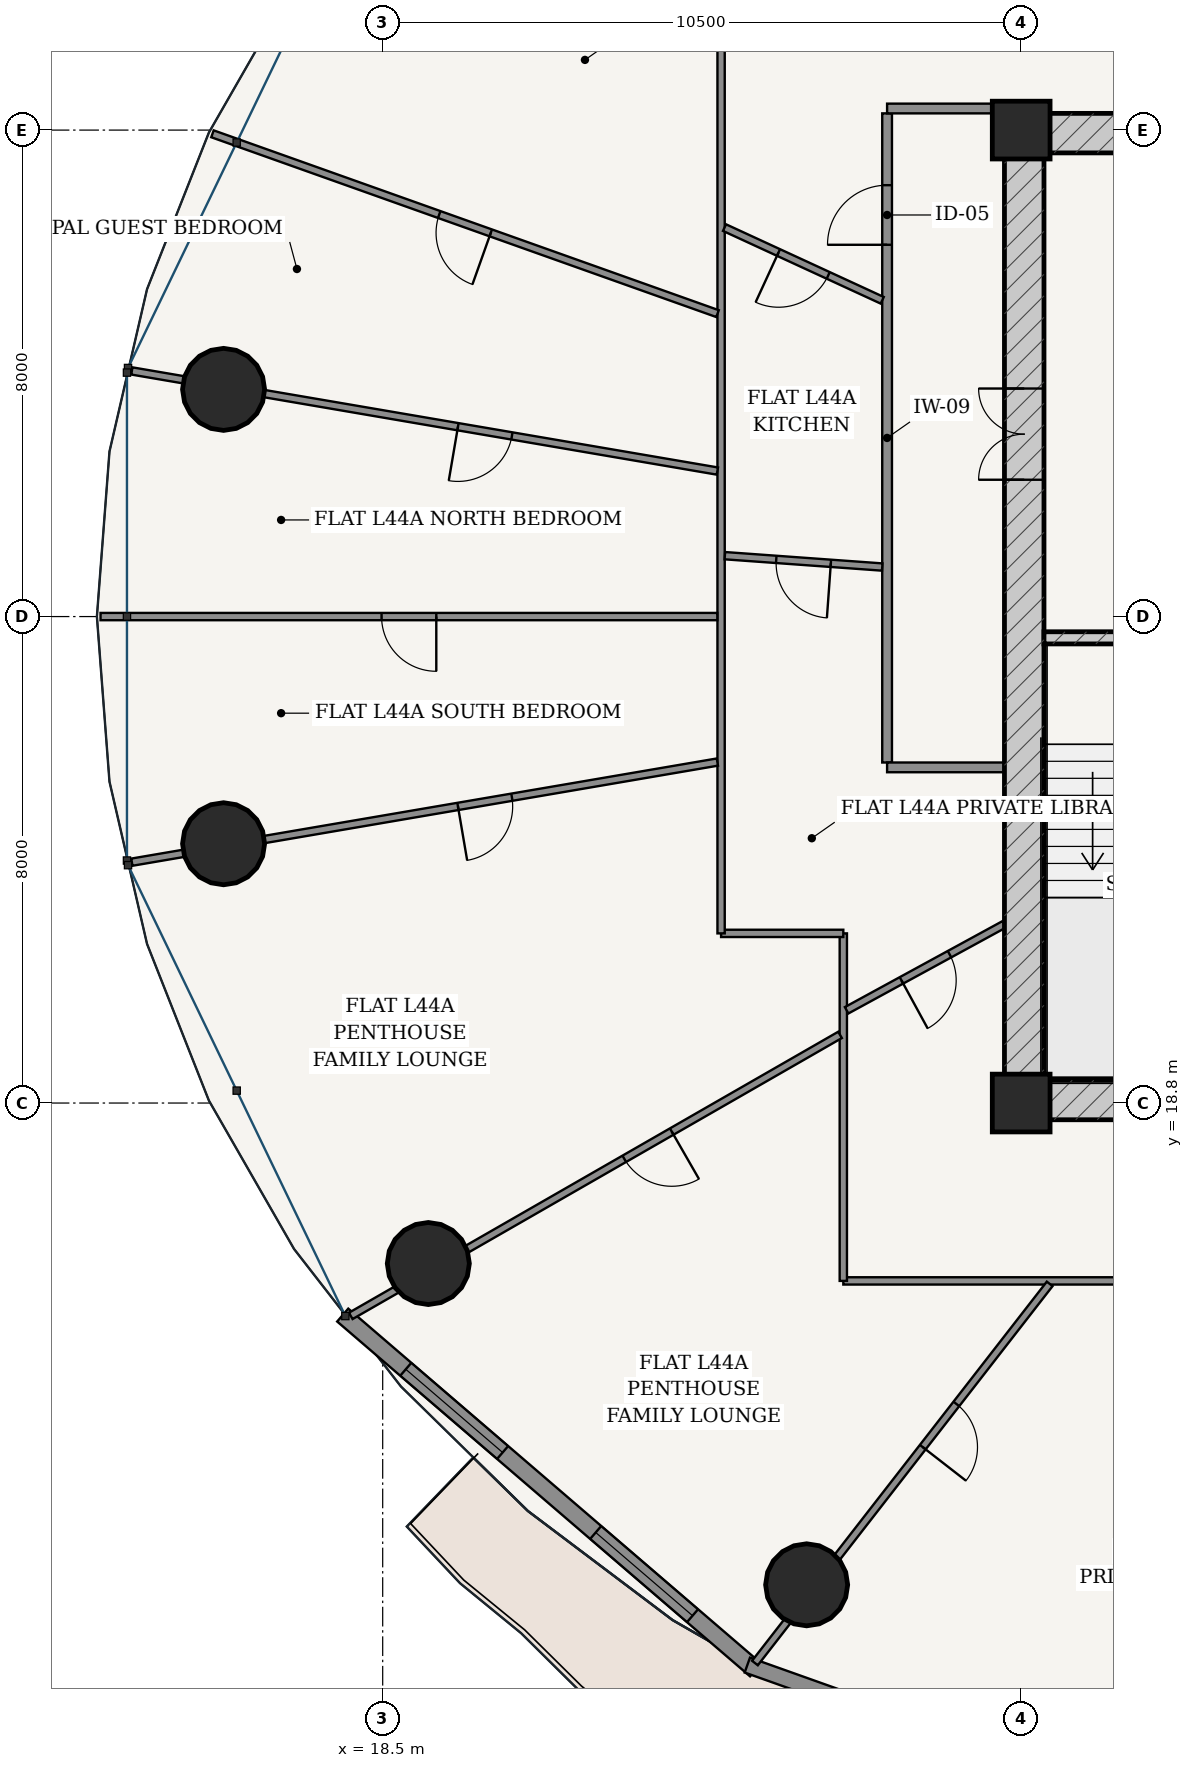
"""IFC4 building model, lengths in metres.
Left out: names, types, materials, properties, quantities, classifications, styles, units other than length and angle.
Written with IfcOpenShell. Run it as: python <this file> out.ifc"""

import sys

from ifc_helpers import new_model, si_unit, direction, frame, frame_2d, origin, origin_2d, place, context, subcontext, project, spatial, rectangle, hollow_circle, extrude, source, transform, mapped, element, fill, save


model = new_model("IFC4")
c1 = context("Model", 3, precision=1e-05, world=origin(), true_north=direction((-0.2419218956, 0.970295726276)))
c2 = subcontext(c1, "Body", "Model", "MODEL_VIEW")
j1 = project(units=[si_unit("LENGTHUNIT", "METRE"), si_unit("PLANEANGLEUNIT", "RADIAN")], contexts=[c1])
p1 = place(None, origin())
s1 = spatial("IfcSite", under=j1, at=p1, CompositionType="ELEMENT")
p2 = place(p1, origin())
s2 = spatial("IfcBuilding", under=s1, at=p2, CompositionType="ELEMENT")
p3 = place(p2, frame((0.0, 0.0, 167.8)))
s3 = spatial("IfcBuildingStorey", under=s2, at=p3, CompositionType="ELEMENT", Elevation=167.8)
for number, where, z_axis, x_axis in (
    (1, (29.0, 18.8, 0.0), (0.0, 0.0, 1.0), (1.0, 0.0, 0.0)),
    (2, (29.0, 34.8, 0.0), (0.0, 0.0, 1.0), (1.0, 0.0, 0.0)),
):
    element("IfcColumn", number, at=place(p3, frame(where, z_axis=z_axis, x_axis=x_axis)), inside=s3, PredefinedType="COLUMN", context=c2, shape_type="SweptSolid", body=[
        extrude(rectangle(XDim=0.95, YDim=0.95, at=origin_2d()), origin(), (0.0, 0.0, 1.0), 3.6),
    ])
p4 = place(p3, frame((28.725, 18.85, 0.0), z_axis=(0.0, 0.0, 1.0), x_axis=(1.0, 0.0, 0.0)))
e3 = element("IfcWall", 3, at=p4, inside=s3, PredefinedType="SHEAR", context=c2, shape_type="SweptSolid", body=[
    extrude(rectangle(XDim=18.55, YDim=0.65, at=frame_2d((9.275, 0.0))), origin(), (0.0, 0.0, 1.0), 3.33),
])
p5 = place(p4, frame((6.81, 0.0, 0.0)))
e4 = element("IfcOpeningElement", 4, at=p5, cuts=e3, PredefinedType="OPENING", context=c2, shape_type="SweptSolid", body=[
    extrude(rectangle(XDim=0.85, YDim=2.1, at=frame_2d((0.425, 1.05))), frame((0.0, 0.335, 0.0), z_axis=(0.0, -1.0, 0.0), x_axis=(1.0, 0.0, 0.0)), (0.0, 0.0, 1.0), 0.67),
])
p6 = place(p4, frame((8.85, 0.0, 0.0)))
e5 = element("IfcOpeningElement", 5, at=p6, cuts=e3, PredefinedType="OPENING", context=c2, shape_type="SweptSolid", body=[
    extrude(rectangle(XDim=0.85, YDim=2.1, at=frame_2d((0.425, 1.05))), frame((0.0, 0.335, 0.0), z_axis=(0.0, -1.0, 0.0), x_axis=(1.0, 0.0, 0.0)), (0.0, 0.0, 1.0), 0.67),
])
p7 = place(p4, frame((10.89, 0.0, 0.0)))
e6 = element("IfcOpeningElement", 6, at=p7, cuts=e3, PredefinedType="OPENING", context=c2, shape_type="SweptSolid", body=[
    extrude(rectangle(XDim=0.85, YDim=2.1, at=frame_2d((0.425, 1.05))), frame((0.0, 0.335, 0.0), z_axis=(0.0, -1.0, 0.0), x_axis=(1.0, 0.0, 0.0)), (0.0, 0.0, 1.0), 0.67),
])
p8 = place(p3, frame((28.725, 34.75, 0.0), z_axis=(0.0, 0.0, 1.0), x_axis=(1.0, 0.0, 0.0)))
e7 = element("IfcWall", 7, at=p8, inside=s3, PredefinedType="SHEAR", context=c2, shape_type="SweptSolid", body=[
    extrude(rectangle(XDim=18.55, YDim=0.65, at=frame_2d((9.275, 0.0))), origin(), (0.0, 0.0, 1.0), 3.33),
])
p9 = place(p3, frame((29.05, 19.175, 0.0), z_axis=(0.0, 0.0, 1.0), x_axis=(0.0, 1.0, 0.0)))
e8 = element("IfcWall", 8, at=p9, inside=s3, PredefinedType="SHEAR", context=c2, shape_type="SweptSolid", body=[
    extrude(rectangle(XDim=15.25, YDim=0.65, at=frame_2d((7.625, 0.0))), origin(), (0.0, 0.0, 1.0), 3.33),
])
p10 = place(p9, frame((9.875, 0.0, 0.0)))
e9 = element("IfcOpeningElement", 9, at=p10, cuts=e8, PredefinedType="OPENING", context=c2, shape_type="SweptSolid", body=[
    extrude(rectangle(XDim=1.5, YDim=2.2, at=frame_2d((0.75, 1.1))), frame((0.0, 0.335, 0.0), z_axis=(0.0, -1.0, 0.0), x_axis=(1.0, 0.0, 0.0)), (0.0, 0.0, 1.0), 0.67),
])
p11 = place(p3, frame((29.375, 26.45, 0.0), z_axis=(0.0, 0.0, 1.0), x_axis=(1.0, 0.0, 0.0)))
e10 = element("IfcWall", 10, at=p11, inside=s3, PredefinedType="SOLIDWALL", context=c2, shape_type="SweptSolid", body=[
    extrude(rectangle(XDim=3.32, YDim=0.2, at=frame_2d((1.66, 0.0))), origin(), (0.0, 0.0, 1.0), 3.33),
])
p12 = place(p11, frame((1.185, 0.0, 0.0)))
e11 = element("IfcOpeningElement", 11, at=p12, cuts=e10, PredefinedType="OPENING", context=c2, shape_type="SweptSolid", body=[
    extrude(rectangle(XDim=0.95, YDim=2.15, at=frame_2d((0.475, 1.075))), frame((0.0, 0.11, 0.0), z_axis=(0.0, -1.0, 0.0), x_axis=(1.0, 0.0, 0.0)), (0.0, 0.0, 1.0), 0.22),
])
for number, where, z_axis, x_axis in (
    (12, (15.883, 30.536, 0.0), (0.0, 0.0, 1.0), (1.0, 0.0, 0.0)),
    (13, (15.883, 23.064, 0.0), (0.0, 0.0, 1.0), (1.0, 0.0, 0.0)),
    (14, (19.25, 16.161, 0.0), (0.0, 0.0, 1.0), (1.0, 0.0, 0.0)),
    (15, (25.472, 10.877, 0.0), (0.0, 0.0, 1.0), (1.0, 0.0, 0.0)),
):
    element("IfcColumn", number, at=place(p3, frame(where, z_axis=z_axis, x_axis=x_axis)), inside=s3, PredefinedType="COLUMN", context=c2, shape_type="SweptSolid", body=[
        extrude(hollow_circle(Radius=0.675, WallThickness=0.042, at=origin_2d()), origin(), (0.0, 0.0, 1.0), 3.6),
    ])
p13 = place(p3, frame((17.843, 15.313, 0.0), z_axis=(0.0, 0.0, 1.0), x_axis=(0.75843401647, -0.651749831348, 0.0)))
e16 = element("IfcWall", 16, at=p13, inside=s3, PredefinedType="SOLIDWALL", context=c2, shape_type="SweptSolid", body=[
    extrude(rectangle(XDim=8.952, YDim=0.28, at=frame_2d((4.476, 0.0))), origin(), (0.0, 0.0, 1.0), 3.33),
])
p14 = place(p13, frame((1.367, 0.0, 0.85)))
e17 = element("IfcOpeningElement", 17, at=p14, cuts=e16, PredefinedType="OPENING", context=c2, shape_type="SweptSolid", body=[
    extrude(rectangle(XDim=2.1, YDim=1.95, at=frame_2d((1.05, 0.975))), frame((0.0, 0.15, 0.0), z_axis=(0.0, -1.0, 0.0), x_axis=(1.0, 0.0, 0.0)), (0.0, 0.0, 1.0), 0.3),
])
p15 = place(p13, frame((5.485, 0.0, 0.85)))
e18 = element("IfcOpeningElement", 18, at=p15, cuts=e16, PredefinedType="OPENING", context=c2, shape_type="SweptSolid", body=[
    extrude(rectangle(XDim=2.1, YDim=1.95, at=frame_2d((1.05, 0.975))), frame((0.0, 0.15, 0.0), z_axis=(0.0, -1.0, 0.0), x_axis=(1.0, 0.0, 0.0)), (0.0, 0.0, 1.0), 0.3),
])
p16 = place(p3, frame((24.497, 9.557, 0.0), z_axis=(0.0, 0.0, 1.0), x_axis=(0.942103604331, -0.335321932934, 0.0)))
e19 = element("IfcWall", 19, at=p16, inside=s3, PredefinedType="SOLIDWALL", context=c2, shape_type="SweptSolid", body=[
    extrude(rectangle(XDim=9.408, YDim=0.26, at=frame_2d((4.704, 0.0))), origin(), (0.0, 0.0, 1.0), 3.33),
])
p17 = place(p16, frame((4.029, 0.0, 0.0)))
e20 = element("IfcOpeningElement", 20, at=p17, cuts=e19, PredefinedType="OPENING", context=c2, shape_type="SweptSolid", body=[
    extrude(rectangle(XDim=1.35, YDim=2.2, at=frame_2d((0.675, 1.1))), frame((0.0, 0.14, 0.0), z_axis=(0.0, -1.0, 0.0), x_axis=(1.0, 0.0, 0.0)), (0.0, 0.0, 1.0), 0.28),
])
p18 = place(p3, frame((26.795, 24.4, 0.0), z_axis=(0.0, 0.0, 1.0), x_axis=(0.0, 1.0, 0.0)))
e21 = element("IfcWall", 21, at=p18, inside=s3, PredefinedType="PARTITIONING", context=c2, shape_type="SweptSolid", body=[
    extrude(rectangle(XDim=10.675, YDim=0.16, at=frame_2d((5.337, 0.0))), origin(), (0.0, 0.0, 1.0), 2.776),
])
p19 = place(p18, frame((8.514, 0.0, 0.0)))
e22 = element("IfcOpeningElement", 22, at=p19, cuts=e21, PredefinedType="OPENING", context=c2, shape_type="SweptSolid", body=[
    extrude(rectangle(XDim=0.98, YDim=2.2, at=frame_2d((0.49, 1.1))), frame((0.0, 0.09, 0.0), z_axis=(0.0, -1.0, 0.0), x_axis=(1.0, 0.0, 0.0)), (0.0, 0.0, 1.0), 0.18),
])
p20 = place(p3, frame((26.795, 35.155, 0.0), z_axis=(0.0, 0.0, 1.0), x_axis=(1.0, 0.0, 0.0)))
e23 = element("IfcWall", 23, at=p20, inside=s3, PredefinedType="PARTITIONING", context=c2, shape_type="SweptSolid", body=[
    extrude(rectangle(XDim=1.93, YDim=0.16, at=frame_2d((0.965, 0.0))), origin(), (0.0, 0.0, 1.0), 2.776),
])
p21 = place(p3, frame((26.795, 24.32, 0.0), z_axis=(0.0, 0.0, 1.0), x_axis=(1.0, 0.0, 0.0)))
e24 = element("IfcWall", 24, at=p21, inside=s3, PredefinedType="PARTITIONING", context=c2, shape_type="SweptSolid", body=[
    extrude(rectangle(XDim=1.93, YDim=0.16, at=frame_2d((0.965, 0.0))), origin(), (0.0, 0.0, 1.0), 3.33),
])
p22 = place(p3, frame((31.59, 15.875, 0.0), z_axis=(0.0, 0.0, 1.0), x_axis=(-1.0, 0.0, 0.0)))
e25 = element("IfcWall", 25, at=p22, inside=s3, PredefinedType="PARTITIONING", context=c2, shape_type="SweptSolid", body=[
    extrude(rectangle(XDim=5.515, YDim=0.12, at=frame_2d((2.758, 0.0))), origin(), (0.0, 0.0, 1.0), 2.776),
])
p23 = place(p3, frame((26.075, 15.875, 0.0), z_axis=(0.0, 0.0, 1.0), x_axis=(0.0, 1.0, 0.0)))
e26 = element("IfcWall", 26, at=p23, inside=s3, PredefinedType="PARTITIONING", context=c2, shape_type="SweptSolid", body=[
    extrude(rectangle(XDim=5.715, YDim=0.12, at=frame_2d((2.857, 0.0))), origin(), (0.0, 0.0, 1.0), 2.776),
])
p24 = place(p3, frame((26.075, 21.59, 0.0), z_axis=(0.0, 0.0, 1.0), x_axis=(-1.0, 0.0, 0.0)))
e27 = element("IfcWall", 27, at=p24, inside=s3, PredefinedType="PARTITIONING", context=c2, shape_type="SweptSolid", body=[
    extrude(rectangle(XDim=2.01, YDim=0.12, at=frame_2d((1.005, 0.0))), origin(), (0.0, 0.0, 1.0), 3.33),
])
p25 = place(p3, frame((24.065, 21.59, 0.0), z_axis=(0.0, 0.0, 1.0), x_axis=(0.0, 1.0, 0.0)))
e28 = element("IfcWall", 28, at=p25, inside=s3, PredefinedType="PARTITIONING", context=c2, shape_type="SweptSolid", body=[
    extrude(rectangle(XDim=16.295, YDim=0.12, at=frame_2d((8.147, 0.0))), origin(), (0.0, 0.0, 1.0), 2.776),
])
p26 = place(p3, frame((24.007, 31.782, 0.0), z_axis=(0.0, 0.0, 1.0), x_axis=(-0.942077868165, 0.335394231187, 0.0)))
e29 = element("IfcWall", 29, at=p26, inside=s3, PredefinedType="PARTITIONING", context=c2, shape_type="SweptSolid", body=[
    extrude(rectangle(XDim=8.817, YDim=0.12, at=frame_2d((4.408, 0.0))), origin(), (0.0, 0.0, 1.0), 2.846),
])
p27 = place(p26, frame((3.958, 0.0, 0.0)))
e30 = element("IfcOpeningElement", 30, at=p27, cuts=e29, PredefinedType="OPENING", context=c2, shape_type="SweptSolid", body=[
    extrude(rectangle(XDim=0.9, YDim=2.15, at=frame_2d((0.45, 1.075))), frame((0.0, 0.07, 0.0), z_axis=(0.0, -1.0, 0.0), x_axis=(1.0, 0.0, 0.0)), (0.0, 0.0, 1.0), 0.14),
])
p28 = place(p3, frame((24.004, 29.193, 0.0), z_axis=(0.0, 0.0, 1.0), x_axis=(-0.985698378271, 0.168519159369, 0.0)))
e31 = element("IfcWall", 31, at=p28, inside=s3, PredefinedType="PARTITIONING", context=c2, shape_type="SweptSolid", body=[
    extrude(rectangle(XDim=9.769, YDim=0.12, at=frame_2d((4.884, 0.0))), origin(), (0.0, 0.0, 1.0), 2.776),
])
p29 = place(p28, frame((3.428, 0.0, 0.0)))
e32 = element("IfcOpeningElement", 32, at=p29, cuts=e31, PredefinedType="OPENING", context=c2, shape_type="SweptSolid", body=[
    extrude(rectangle(XDim=0.9, YDim=2.15, at=frame_2d((0.45, 1.075))), frame((0.0, 0.07, 0.0), z_axis=(0.0, -1.0, 0.0), x_axis=(1.0, 0.0, 0.0)), (0.0, 0.0, 1.0), 0.14),
])
p30 = place(p3, frame((24.003, 26.8, 0.0), z_axis=(0.0, 0.0, 1.0), x_axis=(-1.0, 0.0, 0.0)))
e33 = element("IfcWall", 33, at=p30, inside=s3, PredefinedType="PARTITIONING", context=c2, shape_type="SweptSolid", body=[
    extrude(rectangle(XDim=10.143, YDim=0.12, at=frame_2d((5.071, 0.0))), origin(), (0.0, 0.0, 1.0), 2.846),
])
p31 = place(p30, frame((4.622, 0.0, 0.0)))
e34 = element("IfcOpeningElement", 34, at=p31, cuts=e33, PredefinedType="OPENING", context=c2, shape_type="SweptSolid", body=[
    extrude(rectangle(XDim=0.9, YDim=2.15, at=frame_2d((0.45, 1.075))), frame((0.0, 0.07, 0.0), z_axis=(0.0, -1.0, 0.0), x_axis=(1.0, 0.0, 0.0)), (0.0, 0.0, 1.0), 0.14),
])
p32 = place(p3, frame((24.004, 24.407, 0.0), z_axis=(0.0, 0.0, 1.0), x_axis=(-0.985698378271, -0.168519159369, 0.0)))
e35 = element("IfcWall", 35, at=p32, inside=s3, PredefinedType="PARTITIONING", context=c2, shape_type="SweptSolid", body=[
    extrude(rectangle(XDim=9.769, YDim=0.12, at=frame_2d((4.884, 0.0))), origin(), (0.0, 0.0, 1.0), 2.776),
])
p33 = place(p32, frame((3.428, 0.0, 0.0)))
e36 = element("IfcOpeningElement", 36, at=p33, cuts=e35, PredefinedType="OPENING", context=c2, shape_type="SweptSolid", body=[
    extrude(rectangle(XDim=0.9, YDim=2.15, at=frame_2d((0.45, 1.075))), frame((0.0, 0.07, 0.0), z_axis=(0.0, -1.0, 0.0), x_axis=(1.0, 0.0, 0.0)), (0.0, 0.0, 1.0), 0.14),
])
p34 = place(p3, frame((26.021, 19.921, 0.0), z_axis=(0.0, 0.0, 1.0), x_axis=(-0.867161148693, -0.498027652041, 0.0)))
e37 = element("IfcWall", 37, at=p34, inside=s3, PredefinedType="PARTITIONING", context=c2, shape_type="SweptSolid", body=[
    extrude(rectangle(XDim=9.279, YDim=0.12, at=frame_2d((4.64, 0.0))), origin(), (0.0, 0.0, 1.0), 2.776),
])
p35 = place(p34, frame((3.192, 0.0, 0.0)))
e38 = element("IfcOpeningElement", 38, at=p35, cuts=e37, PredefinedType="OPENING", context=c2, shape_type="SweptSolid", body=[
    extrude(rectangle(XDim=0.9, YDim=2.15, at=frame_2d((0.45, 1.075))), frame((0.0, 0.07, 0.0), z_axis=(0.0, -1.0, 0.0), x_axis=(1.0, 0.0, 0.0)), (0.0, 0.0, 1.0), 0.14),
])
p36 = place(p3, frame((29.469, 15.826, 0.0), z_axis=(0.0, 0.0, 1.0), x_axis=(-0.61373942367, -0.789508657225, 0.0)))
e39 = element("IfcWall", 39, at=p36, inside=s3, PredefinedType="PARTITIONING", context=c2, shape_type="SweptSolid", body=[
    extrude(rectangle(XDim=7.898, YDim=0.12, at=frame_2d((3.949, 0.0))), origin(), (0.0, 0.0, 1.0), 2.776),
])
p37 = place(p36, frame((2.5, 0.0, 0.0)))
e40 = element("IfcOpeningElement", 40, at=p37, cuts=e39, PredefinedType="OPENING", context=c2, shape_type="SweptSolid", body=[
    extrude(rectangle(XDim=0.9, YDim=2.15, at=frame_2d((0.45, 1.075))), frame((0.0, 0.07, 0.0), z_axis=(0.0, -1.0, 0.0), x_axis=(1.0, 0.0, 0.0)), (0.0, 0.0, 1.0), 0.14),
])
p38 = place(p3, frame((26.715, 32.001, 0.0), z_axis=(0.0, 0.0, 1.0), x_axis=(-0.90819942915, 0.418537688735, 0.0)))
e41 = element("IfcWall", 41, at=p38, inside=s3, PredefinedType="PARTITIONING", context=c2, shape_type="SweptSolid", body=[
    extrude(rectangle(XDim=2.856, YDim=0.12, at=frame_2d((1.428, 0.0))), origin(), (0.0, 0.0, 1.0), 3.33),
])
p39 = place(p38, frame((0.978, 0.0, 0.0)))
e42 = element("IfcOpeningElement", 42, at=p39, cuts=e41, PredefinedType="OPENING", context=c2, shape_type="SweptSolid", body=[
    extrude(rectangle(XDim=0.9, YDim=2.15, at=frame_2d((0.45, 1.075))), frame((0.0, 0.07, 0.0), z_axis=(0.0, -1.0, 0.0), x_axis=(1.0, 0.0, 0.0)), (0.0, 0.0, 1.0), 0.14),
])
p40 = place(p3, frame((26.715, 27.615, 0.0), z_axis=(0.0, 0.0, 1.0), x_axis=(-0.997406375801, 0.071975839778, 0.0)))
e43 = element("IfcWall", 43, at=p40, inside=s3, PredefinedType="PARTITIONING", context=c2, shape_type="SweptSolid", body=[
    extrude(rectangle(XDim=2.595, YDim=0.12, at=frame_2d((1.297, 0.0))), origin(), (0.0, 0.0, 1.0), 3.33),
])
p41 = place(p40, frame((0.847, 0.0, 0.0)))
e44 = element("IfcOpeningElement", 44, at=p41, cuts=e43, PredefinedType="OPENING", context=c2, shape_type="SweptSolid", body=[
    extrude(rectangle(XDim=0.9, YDim=2.15, at=frame_2d((0.45, 1.075))), frame((0.0, 0.07, 0.0), z_axis=(0.0, -1.0, 0.0), x_axis=(1.0, 0.0, 0.0)), (0.0, 0.0, 1.0), 0.14),
])
p42 = place(p3, frame((28.723, 21.74, 0.0), z_axis=(0.0, 0.0, 1.0), x_axis=(-0.877892414948, -0.47885792024, 0.0)))
e45 = element("IfcWall", 45, at=p42, inside=s3, PredefinedType="PARTITIONING", context=c2, shape_type="SweptSolid", body=[
    extrude(rectangle(XDim=2.955, YDim=0.12, at=frame_2d((1.477, 0.0))), origin(), (0.0, 0.0, 1.0), 3.33),
])
p43 = place(p42, frame((1.027, 0.0, 0.0)))
e46 = element("IfcOpeningElement", 46, at=p43, cuts=e45, PredefinedType="OPENING", context=c2, shape_type="SweptSolid", body=[
    extrude(rectangle(XDim=0.9, YDim=2.15, at=frame_2d((0.45, 1.075))), frame((0.0, 0.07, 0.0), z_axis=(0.0, -1.0, 0.0), x_axis=(1.0, 0.0, 0.0)), (0.0, 0.0, 1.0), 0.14),
])
m1 = source(origin(), c2, "Body", "SweptSolid", [
    extrude(rectangle(XDim=2.1, YDim=1.95, at=frame_2d((1.05, 0.975))), frame((0.0, 0.03, 0.0), z_axis=(0.0, -1.0, 0.0), x_axis=(1.0, 0.0, 0.0)), (0.0, 0.0, 1.0), 0.06),
])
p44 = place(p14, origin())
e47 = element("IfcWindow", 47, at=p44, inside=s3, PartitioningType="SINGLE_PANEL", PredefinedType="WINDOW", context=c2, shape_type="MappedRepresentation", body=[
    mapped(m1, transform((0.0, 0.0, 0.0), scale=1.0)),
])
fill(e17, e47)
p45 = place(p15, origin())
e48 = element("IfcWindow", 48, at=p45, inside=s3, PartitioningType="SINGLE_PANEL", PredefinedType="WINDOW", context=c2, shape_type="MappedRepresentation", body=[
    mapped(m1, transform((0.0, 0.0, 0.0), scale=1.0)),
])
fill(e18, e48)
m2 = source(origin(), c2, "Body", "SweptSolid", [
    extrude(rectangle(XDim=1.5, YDim=2.2, at=frame_2d((0.75, 1.1))), frame((0.0, 0.025, 0.0), z_axis=(0.0, -1.0, 0.0), x_axis=(1.0, 0.0, 0.0)), (0.0, 0.0, 1.0), 0.05),
])
p46 = place(p10, origin())
e49 = element("IfcDoor", 49, at=p46, inside=s3, OperationType="DOUBLE_DOOR_SINGLE_SWING", PredefinedType="DOOR", context=c2, shape_type="MappedRepresentation", body=[
    mapped(m2, transform((0.0, 0.0, 0.0), scale=1.0)),
])
fill(e9, e49)
m3 = source(origin(), c2, "Body", "SweptSolid", [
    extrude(rectangle(XDim=0.98, YDim=2.2, at=frame_2d((0.49, 1.1))), frame((0.0, 0.025, 0.0), z_axis=(0.0, -1.0, 0.0), x_axis=(1.0, 0.0, 0.0)), (0.0, 0.0, 1.0), 0.05),
])
p47 = place(p19, origin())
e50 = element("IfcDoor", 50, at=p47, inside=s3, OperationType="SINGLE_SWING_LEFT", PredefinedType="DOOR", context=c2, shape_type="MappedRepresentation", body=[
    mapped(m3, transform((0.0, 0.0, 0.0), scale=1.0)),
])
fill(e22, e50)
m4 = source(origin(), c2, "Body", "SweptSolid", [
    extrude(rectangle(XDim=0.9, YDim=2.15, at=frame_2d((0.45, 1.075))), frame((0.0, 0.025, 0.0), z_axis=(0.0, -1.0, 0.0), x_axis=(1.0, 0.0, 0.0)), (0.0, 0.0, 1.0), 0.05),
])
p48 = place(p39, origin())
e51 = element("IfcDoor", 51, at=p48, inside=s3, OperationType="SINGLE_SWING_RIGHT", PredefinedType="DOOR", context=c2, shape_type="MappedRepresentation", body=[
    mapped(m4, transform((0.0, 0.0, 0.0), scale=1.0)),
])
fill(e42, e51)
p49 = place(p41, origin())
e52 = element("IfcDoor", 52, at=p49, inside=s3, OperationType="SINGLE_SWING_LEFT", PredefinedType="DOOR", context=c2, shape_type="MappedRepresentation", body=[
    mapped(m4, transform((0.0, 0.0, 0.0), scale=1.0)),
])
fill(e44, e52)
p50 = place(p43, origin())
e53 = element("IfcDoor", 53, at=p50, inside=s3, OperationType="SINGLE_SWING_RIGHT", PredefinedType="DOOR", context=c2, shape_type="MappedRepresentation", body=[
    mapped(m4, transform((0.0, 0.0, 0.0), scale=1.0)),
])
fill(e46, e53)
p51 = place(p27, origin())
e54 = element("IfcDoor", 54, at=p51, inside=s3, OperationType="SINGLE_SWING_LEFT", PredefinedType="DOOR", context=c2, shape_type="MappedRepresentation", body=[
    mapped(m4, transform((0.0, 0.0, 0.0), scale=1.0)),
])
fill(e30, e54)
p52 = place(p29, origin())
e55 = element("IfcDoor", 55, at=p52, inside=s3, OperationType="SINGLE_SWING_RIGHT", PredefinedType="DOOR", context=c2, shape_type="MappedRepresentation", body=[
    mapped(m4, transform((0.0, 0.0, 0.0), scale=1.0)),
])
fill(e32, e55)
p53 = place(p31, origin())
e56 = element("IfcDoor", 56, at=p53, inside=s3, OperationType="SINGLE_SWING_LEFT", PredefinedType="DOOR", context=c2, shape_type="MappedRepresentation", body=[
    mapped(m4, transform((0.0, 0.0, 0.0), scale=1.0)),
])
fill(e34, e56)
p54 = place(p33, origin())
e57 = element("IfcDoor", 57, at=p54, inside=s3, OperationType="SINGLE_SWING_RIGHT", PredefinedType="DOOR", context=c2, shape_type="MappedRepresentation", body=[
    mapped(m4, transform((0.0, 0.0, 0.0), scale=1.0)),
])
fill(e36, e57)
p55 = place(p35, origin())
e58 = element("IfcDoor", 58, at=p55, inside=s3, OperationType="SINGLE_SWING_LEFT", PredefinedType="DOOR", context=c2, shape_type="MappedRepresentation", body=[
    mapped(m4, transform((0.0, 0.0, 0.0), scale=1.0)),
])
fill(e38, e58)
p56 = place(p37, origin())
e59 = element("IfcDoor", 59, at=p56, inside=s3, OperationType="SINGLE_SWING_RIGHT", PredefinedType="DOOR", context=c2, shape_type="MappedRepresentation", body=[
    mapped(m4, transform((0.0, 0.0, 0.0), scale=1.0)),
])
fill(e40, e59)
save(model, sys.argv[1])
